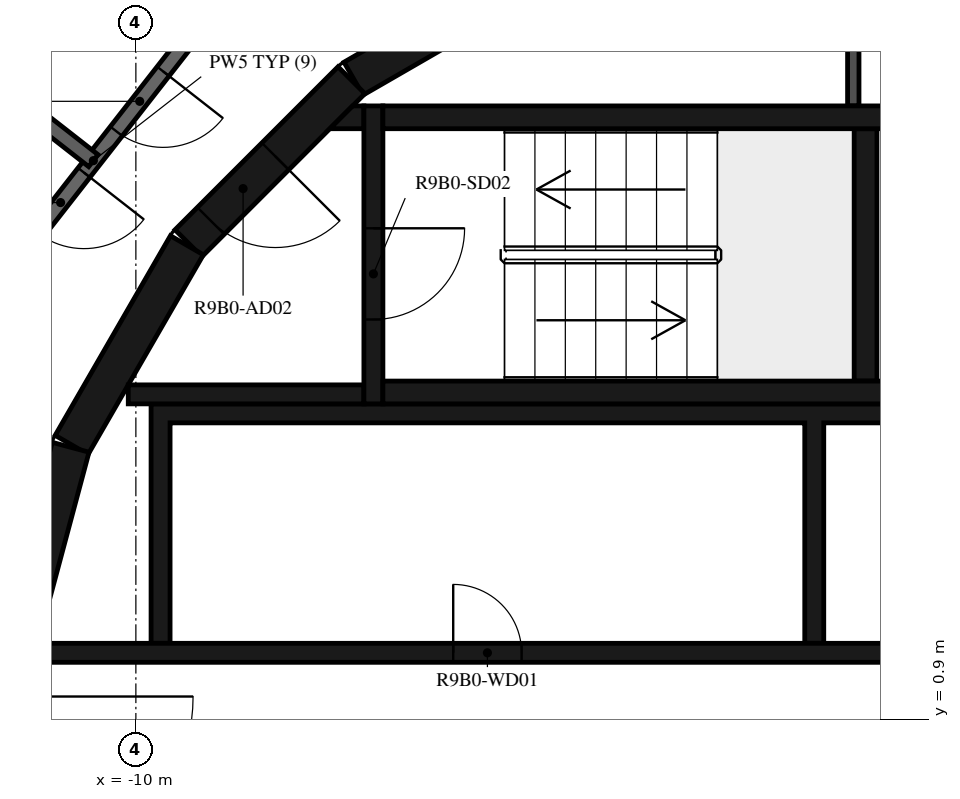
"""IFC4 building model, lengths in metres.
Left out: names, types, materials, properties, quantities, classifications, styles, units other than length and angle.
Written with IfcOpenShell. Run it as: python <this file> out.ifc"""

import sys

from ifc_helpers import new_model, si_unit, direction, frame, frame_2d, origin, place, context, subcontext, project, spatial, polyline, rectangle, outline, extrude, element, fill, save


model = new_model("IFC4")
c1 = context("Model", 3, precision=1e-05, world=origin(), true_north=direction((0.0, 1.0)))
c2 = subcontext(c1, "Body", "Model", "MODEL_VIEW")
j1 = project(units=[si_unit("LENGTHUNIT", "METRE"), si_unit("PLANEANGLEUNIT", "RADIAN")], contexts=[c1])
p1 = place(None, origin())
s1 = spatial("IfcSite", under=j1, at=p1, CompositionType="ELEMENT")
p2 = place(p1, origin())
s2 = spatial("IfcBuilding", under=s1, at=p2, CompositionType="ELEMENT")
p3 = place(p2, frame((0.0, 0.0, 347.0)))
s3 = spatial("IfcBuildingStorey", under=s2, at=p3, CompositionType="ELEMENT", Elevation=347.0)
p4 = place(p3, frame((-4.51, 10.845, 0.0), z_axis=(0.0, 0.0, 1.0), x_axis=(-0.865975092491, -0.500087131594, 0.0)))
e1 = element("IfcWall", 1, at=p4, inside=s3, PredefinedType="SHEAR", context=c2, shape_type="SweptSolid", body=[
    extrude(rectangle(XDim=3.033, YDim=0.5, at=frame_2d((1.516, 0.0))), origin(), (0.0, 0.0, 1.0), 3.12),
])
p5 = place(p3, frame((-7.164, 9.308, 0.0), z_axis=(0.0, 0.0, 1.0), x_axis=(-0.707106781187, -0.707106781187, 0.0)))
e2 = element("IfcWall", 2, at=p5, inside=s3, PredefinedType="SHEAR", context=c2, shape_type="SweptSolid", body=[
    extrude(rectangle(XDim=3.032, YDim=0.5, at=frame_2d((1.516, 0.0))), origin(), (0.0, 0.0, 1.0), 3.12),
])
p6 = place(p5, frame((1.416, 0.0, 0.0)))
e3 = element("IfcOpeningElement", 3, at=p6, cuts=e2, PredefinedType="OPENING", context=c2, shape_type="SweptSolid", body=[
    extrude(rectangle(XDim=1.2, YDim=2.1, at=frame_2d((0.6, 1.05))), frame((0.0, 0.26, 0.0), z_axis=(0.0, -1.0, 0.0), x_axis=(1.0, 0.0, 0.0)), (0.0, 0.0, 1.0), 0.52),
])
for number, where, z_axis, x_axis in (
    (4, (-9.329, 7.137, 0.0), (0.0, 0.0, 1.0), (-0.5, -0.866, 0.0)),
    (5, (-10.858, 4.479, 0.0), (0.0, 0.0, 1.0), (-0.259, -0.966, 0.0)),
):
    element("IfcWall", number, at=place(p3, frame(where, z_axis=z_axis, x_axis=x_axis)), inside=s3, PredefinedType="SHEAR", context=c2, shape_type="SweptSolid", body=[
        extrude(rectangle(XDim=3.033, YDim=0.5, at=frame_2d((1.516, 0.0))), origin(), (0.0, 0.0, 1.0), 3.12),
    ])
for number, where, z_axis, x_axis in (
    (6, (-6.75, 5.2, 0.0), (0.0, 0.0, 1.0), (1.0, 0.0, 0.0)),
    (7, (-6.75, 8.82, 0.0), (0.0, 0.0, 1.0), (1.0, 0.0, 0.0)),
):
    element("IfcWall", number, at=place(p3, frame(where, z_axis=z_axis, x_axis=x_axis)), inside=s3, PredefinedType="SHEAR", context=c2, shape_type="SweptSolid", body=[
        extrude(rectangle(XDim=6.75, YDim=0.3, at=frame_2d((3.375, 0.0))), origin(), (0.0, 0.0, 1.0), 3.12),
    ])
p7 = place(p3, frame((-0.4, 5.35, 0.0), z_axis=(0.0, 0.0, 1.0), x_axis=(0.0, 1.0, 0.0)))
e8 = element("IfcWall", 8, at=p7, inside=s3, PredefinedType="SHEAR", context=c2, shape_type="SweptSolid", body=[
    extrude(rectangle(XDim=3.32, YDim=0.3, at=frame_2d((1.66, 0.0))), origin(), (0.0, 0.0, 1.0), 3.12),
])
p8 = place(p3, frame((-6.875, 8.97, 0.0), z_axis=(0.0, 0.0, 1.0), x_axis=(0.0, -1.0, 0.0)))
e9 = element("IfcWall", 9, at=p8, inside=s3, PredefinedType="SHEAR", context=c2, shape_type="SweptSolid", body=[
    extrude(rectangle(XDim=3.92, YDim=0.25, at=frame_2d((1.96, 0.0))), origin(), (0.0, 0.0, 1.0), 3.12),
])
p9 = place(p8, frame((1.61, 0.0, 0.0)))
e10 = element("IfcOpeningElement", 10, at=p9, cuts=e9, PredefinedType="OPENING", context=c2, shape_type="SweptSolid", body=[
    extrude(rectangle(XDim=1.2, YDim=2.1, at=frame_2d((0.6, 1.05))), frame((0.0, 0.135, 0.0), z_axis=(0.0, -1.0, 0.0), x_axis=(1.0, 0.0, 0.0)), (0.0, 0.0, 1.0), 0.27),
])
p10 = place(p3, frame((-7.0, 5.175, 0.0), z_axis=(0.0, 0.0, 1.0), x_axis=(-1.0, 0.0, 0.0)))
e11 = element("IfcWall", 11, at=p10, inside=s3, PredefinedType="SHEAR", context=c2, shape_type="SweptSolid", body=[
    extrude(rectangle(XDim=3.1, YDim=0.25, at=frame_2d((1.55, 0.0))), origin(), (0.0, 0.0, 1.0), 3.12),
])
p11 = place(p3, origin())
e12 = element("IfcWall", 12, at=p11, inside=s3, PredefinedType="SHEAR", context=c2, shape_type="SweptSolid", body=[
    extrude(outline(polyline([(-7.148, 8.97), (-7.0, 8.97), (-7.0, 8.67), (-7.448, 8.67), (-7.148, 8.97)])), origin(), (0.0, 0.0, 1.0), 3.12),
])
p12 = place(p3, origin())
e13 = element("IfcWall", 13, at=p12, inside=s3, PredefinedType="SHEAR", context=c2, shape_type="SweptSolid", body=[
    extrude(outline(polyline([(-9.8, 1.9), (-9.55, 1.9), (-9.55, 4.8), (-1.2, 4.8), (-1.2, 1.9), (-0.95, 1.9), (-0.95, 4.8), (3.1, 4.8), (3.1, 1.9), (3.35, 1.9), (3.35, 4.8), (5.25, 4.8), (5.25, 1.9), (5.5, 1.9), (5.5, 4.8), (7.4, 4.8), (7.4, 1.9), (7.65, 1.9), (7.65, 4.8), (9.55, 4.8), (9.55, 1.9), (9.8, 1.9), (9.8, 4.8), (9.8, 5.05), (-9.8, 5.05), (-9.8, 4.8), (-9.8, 1.9)])), origin(), (0.0, 0.0, 1.0), 3.12),
])
p13 = place(p3, frame((-11.28, 1.775, 0.0), z_axis=(0.0, 0.0, 1.0), x_axis=(1.0, 0.0, 0.0)))
e14 = element("IfcWall", 14, at=p13, inside=s3, PredefinedType="SHEAR", context=c2, shape_type="SweptSolid", body=[
    extrude(rectangle(XDim=14.38, YDim=0.25, at=frame_2d((7.19, 0.0))), origin(), (0.0, 0.0, 1.0), 3.12),
])
p14 = place(p13, frame((5.455, 0.0, 0.0)))
e15 = element("IfcOpeningElement", 15, at=p14, cuts=e14, PredefinedType="OPENING", context=c2, shape_type="SweptSolid", body=[
    extrude(rectangle(XDim=0.9, YDim=2.1, at=frame_2d((0.45, 1.05))), frame((0.0, 0.135, 0.0), z_axis=(0.0, -1.0, 0.0), x_axis=(1.0, 0.0, 0.0)), (0.0, 0.0, 1.0), 0.27),
])
p15 = place(p13, frame((11.905, 0.0, 0.0)))
e16 = element("IfcOpeningElement", 16, at=p15, cuts=e14, PredefinedType="OPENING", context=c2, shape_type="SweptSolid", body=[
    extrude(rectangle(XDim=0.9, YDim=2.1, at=frame_2d((0.45, 1.05))), frame((0.0, 0.135, 0.0), z_axis=(0.0, -1.0, 0.0), x_axis=(1.0, 0.0, 0.0)), (0.0, 0.0, 1.0), 0.27),
])
p16 = place(p3, frame((-0.562, 8.97, 0.0), z_axis=(0.0, 0.0, 1.0), x_axis=(0.0, 1.0, 0.0)))
e17 = element("IfcWall", 17, at=p16, inside=s3, PredefinedType="PARTITIONING", context=c2, shape_type="SweptSolid", body=[
    extrude(rectangle(XDim=2.427, YDim=0.15, at=frame_2d((1.214, 0.0))), origin(), (0.0, 0.0, 1.0), 3.12),
])
p17 = place(p16, frame((0.764, 0.0, 0.0)))
e18 = element("IfcOpeningElement", 18, at=p17, cuts=e17, PredefinedType="OPENING", context=c2, shape_type="SweptSolid", body=[
    extrude(rectangle(XDim=0.9, YDim=2.1, at=frame_2d((0.45, 1.05))), frame((0.0, 0.085, 0.0), z_axis=(0.0, -1.0, 0.0), x_axis=(1.0, 0.0, 0.0)), (0.0, 0.0, 1.0), 0.17),
])
p18 = place(p3, frame((-8.349, 11.079, 0.0), z_axis=(0.0, 0.0, 1.0), x_axis=(-0.615669112324, -0.78800478687, 0.0)))
e19 = element("IfcWall", 19, at=p18, inside=s3, PredefinedType="STANDARD", context=c2, shape_type="SweptSolid", body=[
    extrude(rectangle(XDim=7.181, YDim=0.2, at=frame_2d((3.591, 0.0))), origin(), (0.0, 0.0, 1.0), 3.12),
])
p19 = place(p18, frame((2.1, 0.0, 0.0)))
e20 = element("IfcOpeningElement", 20, at=p19, cuts=e19, PredefinedType="OPENING", context=c2, shape_type="SweptSolid", body=[
    extrude(rectangle(XDim=1.0, YDim=2.1, at=frame_2d((0.5, 1.05))), frame((0.0, 0.11, 0.0), z_axis=(0.0, -1.0, 0.0), x_axis=(1.0, 0.0, 0.0)), (0.0, 0.0, 1.0), 0.22),
])
p20 = place(p18, frame((3.79, 0.0, 0.0)))
e21 = element("IfcOpeningElement", 21, at=p20, cuts=e19, PredefinedType="OPENING", context=c2, shape_type="SweptSolid", body=[
    extrude(rectangle(XDim=1.0, YDim=2.1, at=frame_2d((0.5, 1.05))), frame((0.0, 0.11, 0.0), z_axis=(0.0, -1.0, 0.0), x_axis=(1.0, 0.0, 0.0)), (0.0, 0.0, 1.0), 0.22),
])
p21 = place(p3, frame((-12.479, 9.75, 0.0), z_axis=(0.0, 0.0, 1.0), x_axis=(0.788050197026, -0.615610986717, 0.0)))
e22 = element("IfcWall", 22, at=p21, inside=s3, PredefinedType="STANDARD", context=c2, shape_type="SweptSolid", body=[
    extrude(rectangle(XDim=2.437, YDim=0.2, at=frame_2d((1.218, 0.0))), origin(), (0.0, 0.0, 1.0), 3.12),
])
p22 = place(p3, frame((-9.283, 12.319, 0.0), z_axis=(0.0, 0.0, 1.0), x_axis=(-0.61567489546, -0.788000268464, 0.0)))
e23 = element("IfcWall", 23, at=p22, inside=s3, PredefinedType="PARTITIONING", context=c2, shape_type="SweptSolid", body=[
    extrude(rectangle(XDim=7.985, YDim=0.12, at=frame_2d((3.992, 0.0))), origin(), (0.0, 0.0, 1.0), 3.12),
])
p23 = place(p22, frame((0.2, 0.0, 0.0)))
e24 = element("IfcOpeningElement", 24, at=p23, cuts=e23, PredefinedType="OPENING", context=c2, shape_type="SweptSolid", body=[
    extrude(rectangle(XDim=0.9, YDim=2.1, at=frame_2d((0.45, 1.05))), frame((0.0, 0.07, 0.0), z_axis=(0.0, -1.0, 0.0), x_axis=(1.0, 0.0, 0.0)), (0.0, 0.0, 1.0), 0.14),
])
p24 = place(p22, frame((4.592, 0.0, 0.0)))
e25 = element("IfcOpeningElement", 25, at=p24, cuts=e23, PredefinedType="OPENING", context=c2, shape_type="SweptSolid", body=[
    extrude(rectangle(XDim=0.9, YDim=2.1, at=frame_2d((0.45, 1.05))), frame((0.0, 0.07, 0.0), z_axis=(0.0, -1.0, 0.0), x_axis=(1.0, 0.0, 0.0)), (0.0, 0.0, 1.0), 0.14),
])
p25 = place(p9, origin())
e26 = element("IfcDoor", 26, at=p25, inside=s3, OperationType="SINGLE_SWING_LEFT", PredefinedType="DOOR", context=c2, shape_type="SweptSolid", body=[
    extrude(rectangle(XDim=1.2, YDim=2.1, at=frame_2d((0.6, 1.05))), frame((0.0, 0.025, 0.0), z_axis=(0.0, -1.0, 0.0), x_axis=(1.0, 0.0, 0.0)), (0.0, 0.0, 1.0), 0.05),
])
fill(e10, e26)
p26 = place(p6, origin())
e27 = element("IfcDoor", 27, at=p26, inside=s3, OperationType="SINGLE_SWING_RIGHT", PredefinedType="DOOR", context=c2, shape_type="SweptSolid", body=[
    extrude(rectangle(XDim=1.2, YDim=2.1, at=frame_2d((0.6, 1.05))), frame((0.0, 0.025, 0.0), z_axis=(0.0, -1.0, 0.0), x_axis=(1.0, 0.0, 0.0)), (0.0, 0.0, 1.0), 0.05),
])
fill(e3, e27)
p27 = place(p14, origin())
e28 = element("IfcDoor", 28, at=p27, inside=s3, OperationType="SINGLE_SWING_LEFT", PredefinedType="DOOR", context=c2, shape_type="SweptSolid", body=[
    extrude(rectangle(XDim=0.9, YDim=2.1, at=frame_2d((0.45, 1.05))), frame((0.0, 0.025, 0.0), z_axis=(0.0, -1.0, 0.0), x_axis=(1.0, 0.0, 0.0)), (0.0, 0.0, 1.0), 0.05),
])
fill(e15, e28)
p28 = place(p19, origin())
e29 = element("IfcDoor", 29, at=p28, inside=s3, OperationType="SINGLE_SWING_RIGHT", PredefinedType="DOOR", context=c2, shape_type="SweptSolid", body=[
    extrude(rectangle(XDim=1.0, YDim=2.1, at=frame_2d((0.5, 1.05))), frame((0.0, 0.025, 0.0), z_axis=(0.0, -1.0, 0.0), x_axis=(1.0, 0.0, 0.0)), (0.0, 0.0, 1.0), 0.05),
])
fill(e20, e29)
p29 = place(p20, origin())
e30 = element("IfcDoor", 30, at=p29, inside=s3, OperationType="SINGLE_SWING_LEFT", PredefinedType="DOOR", context=c2, shape_type="SweptSolid", body=[
    extrude(rectangle(XDim=1.0, YDim=2.1, at=frame_2d((0.5, 1.05))), frame((0.0, 0.025, 0.0), z_axis=(0.0, -1.0, 0.0), x_axis=(1.0, 0.0, 0.0)), (0.0, 0.0, 1.0), 0.05),
])
fill(e21, e30)
save(model, sys.argv[1])
